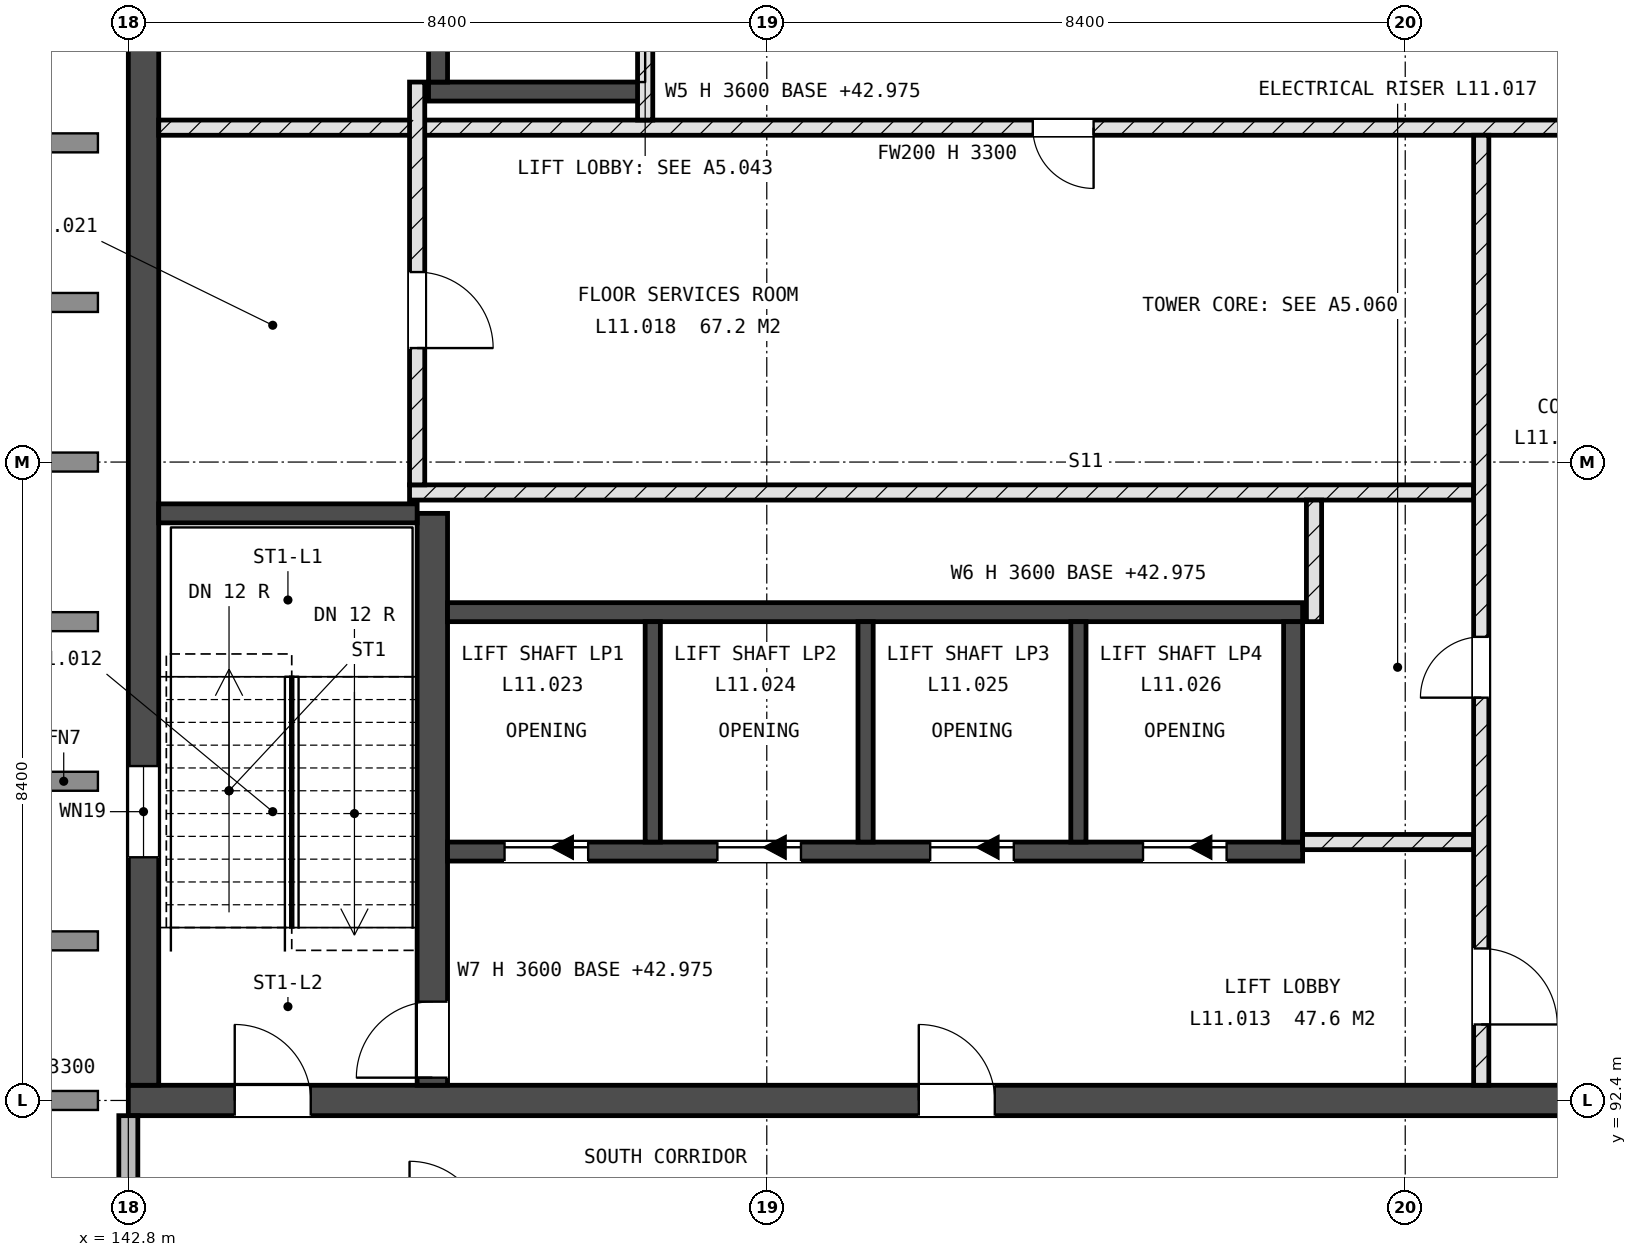
"""IFC4 building model, lengths in metres.
Left out: names, types, materials, properties, quantities, classifications, styles, units other than length and angle.
Written with IfcOpenShell. Run it as: python <this file> out.ifc"""

import sys

from ifc_helpers import new_model, si_unit, direction, frame, frame_2d, origin, place, context, subcontext, project, spatial, rectangle, extrude, element, fill, save


model = new_model("IFC4")
c1 = context("Model", 3, precision=1e-05, world=origin(), true_north=direction((0.0, 1.0)))
c2 = subcontext(c1, "Body", "Model", "MODEL_VIEW")
j1 = project(units=[si_unit("LENGTHUNIT", "METRE"), si_unit("PLANEANGLEUNIT", "RADIAN")], contexts=[c1])
p1 = place(None, origin())
s1 = spatial("IfcSite", under=j1, at=p1, CompositionType="ELEMENT")
p2 = place(p1, origin())
s2 = spatial("IfcBuilding", under=s1, at=p2, CompositionType="ELEMENT")
p3 = place(p2, frame((0.0, 0.0, 43.2)))
s3 = spatial("IfcBuildingStorey", under=s2, at=p3, CompositionType="ELEMENT", Elevation=43.2)
p4 = place(p3, frame((142.8, 92.4, -0.225), z_axis=(0.0, 0.0, 1.0), x_axis=(1.0, 0.0, 0.0)))
e1 = element("IfcWall", 1, at=p4, inside=s3, PredefinedType="SHEAR", context=c2, shape_type="SweptSolid", body=[
    extrude(rectangle(XDim=25.2, YDim=0.4, at=frame_2d((12.6, 0.0))), origin(), (0.0, 0.0, 1.0), 3.6),
])
p5 = place(p4, frame((1.4, 0.0, 0.225)))
e2 = element("IfcOpeningElement", 2, at=p5, cuts=e1, PredefinedType="OPENING", context=c2, shape_type="SweptSolid", body=[
    extrude(rectangle(XDim=1.0, YDim=2.1, at=frame_2d((0.5, 1.05))), frame((0.0, 0.21, 0.0), z_axis=(0.0, -1.0, 0.0), x_axis=(1.0, 0.0, 0.0)), (0.0, 0.0, 1.0), 0.42),
])
p6 = place(p4, frame((19.1, 0.0, 0.225)))
e3 = element("IfcOpeningElement", 3, at=p6, cuts=e1, PredefinedType="OPENING", context=c2, shape_type="SweptSolid", body=[
    extrude(rectangle(XDim=1.0, YDim=2.1, at=frame_2d((0.5, 1.05))), frame((0.0, 0.21, 0.0), z_axis=(0.0, -1.0, 0.0), x_axis=(1.0, 0.0, 0.0)), (0.0, 0.0, 1.0), 0.42),
])
p7 = place(p4, frame((10.4, 0.0, 0.225)))
e4 = element("IfcOpeningElement", 4, at=p7, cuts=e1, PredefinedType="OPENING", context=c2, shape_type="SweptSolid", body=[
    extrude(rectangle(XDim=1.0, YDim=2.1, at=frame_2d((0.5, 1.05))), frame((0.0, 0.21, 0.0), z_axis=(0.0, -1.0, 0.0), x_axis=(1.0, 0.0, 0.0)), (0.0, 0.0, 1.0), 0.42),
])
p8 = place(p3, frame((143.0, 92.6, -0.225), z_axis=(0.0, 0.0, 1.0), x_axis=(0.0, 1.0, 0.0)))
e5 = element("IfcWall", 5, at=p8, inside=s3, PredefinedType="SHEAR", context=c2, shape_type="SweptSolid", body=[
    extrude(rectangle(XDim=16.4, YDim=0.4, at=frame_2d((8.2, 0.0))), origin(), (0.0, 0.0, 1.0), 3.6),
])
p9 = place(p8, frame((3.0, 0.0, 1.825)))
e6 = element("IfcOpeningElement", 6, at=p9, cuts=e5, PredefinedType="OPENING", context=c2, shape_type="SweptSolid", body=[
    extrude(rectangle(XDim=1.2, YDim=0.9, at=frame_2d((0.6, 0.45))), frame((0.0, 0.21, 0.0), z_axis=(0.0, -1.0, 0.0), x_axis=(1.0, 0.0, 0.0)), (0.0, 0.0, 1.0), 0.42),
])
p10 = place(p3, frame((146.8, 92.6, -0.225), z_axis=(0.0, 0.0, 1.0), x_axis=(0.0, 1.0, 0.0)))
e7 = element("IfcWall", 7, at=p10, inside=s3, PredefinedType="SHEAR", context=c2, shape_type="SweptSolid", body=[
    extrude(rectangle(XDim=7.525, YDim=0.4, at=frame_2d((3.762, 0.0))), origin(), (0.0, 0.0, 1.0), 3.6),
])
p11 = place(p10, frame((0.1, 0.0, 0.225)))
e8 = element("IfcOpeningElement", 8, at=p11, cuts=e7, PredefinedType="OPENING", context=c2, shape_type="SweptSolid", body=[
    extrude(rectangle(XDim=1.0, YDim=2.1, at=frame_2d((0.5, 1.05))), frame((0.0, 0.21, 0.0), z_axis=(0.0, -1.0, 0.0), x_axis=(1.0, 0.0, 0.0)), (0.0, 0.0, 1.0), 0.42),
])
p12 = place(p3, frame((143.2, 100.125, -0.225), z_axis=(0.0, 0.0, 1.0), x_axis=(1.0, 0.0, 0.0)))
e9 = element("IfcWall", 9, at=p12, inside=s3, PredefinedType="SHEAR", context=c2, shape_type="SweptSolid", body=[
    extrude(rectangle(XDim=3.4, YDim=0.25, at=frame_2d((1.7, 0.0))), origin(), (0.0, 0.0, 1.0), 3.6),
])
p13 = place(p3, frame((147.0, 95.675, -0.225), z_axis=(0.0, 0.0, 1.0), x_axis=(1.0, 0.0, 0.0)))
e10 = element("IfcWall", 10, at=p13, inside=s3, PredefinedType="SHEAR", context=c2, shape_type="SweptSolid", body=[
    extrude(rectangle(XDim=11.25, YDim=0.25, at=frame_2d((5.625, 0.0))), origin(), (0.0, 0.0, 1.0), 3.6),
])
p14 = place(p13, frame((0.75, 0.0, 0.225)))
e11 = element("IfcOpeningElement", 11, at=p14, cuts=e10, PredefinedType="OPENING", context=c2, shape_type="SweptSolid", body=[
    extrude(rectangle(XDim=1.1, YDim=2.1, at=frame_2d((0.55, 1.05))), frame((0.0, 0.135, 0.0), z_axis=(0.0, -1.0, 0.0), x_axis=(1.0, 0.0, 0.0)), (0.0, 0.0, 1.0), 0.27),
])
p15 = place(p13, frame((3.55, 0.0, 0.225)))
e12 = element("IfcOpeningElement", 12, at=p15, cuts=e10, PredefinedType="OPENING", context=c2, shape_type="SweptSolid", body=[
    extrude(rectangle(XDim=1.1, YDim=2.1, at=frame_2d((0.55, 1.05))), frame((0.0, 0.135, 0.0), z_axis=(0.0, -1.0, 0.0), x_axis=(1.0, 0.0, 0.0)), (0.0, 0.0, 1.0), 0.27),
])
p16 = place(p13, frame((6.35, 0.0, 0.225)))
e13 = element("IfcOpeningElement", 13, at=p16, cuts=e10, PredefinedType="OPENING", context=c2, shape_type="SweptSolid", body=[
    extrude(rectangle(XDim=1.1, YDim=2.1, at=frame_2d((0.55, 1.05))), frame((0.0, 0.135, 0.0), z_axis=(0.0, -1.0, 0.0), x_axis=(1.0, 0.0, 0.0)), (0.0, 0.0, 1.0), 0.27),
])
p17 = place(p13, frame((9.15, 0.0, 0.225)))
e14 = element("IfcOpeningElement", 14, at=p17, cuts=e10, PredefinedType="OPENING", context=c2, shape_type="SweptSolid", body=[
    extrude(rectangle(XDim=1.1, YDim=2.1, at=frame_2d((0.55, 1.05))), frame((0.0, 0.135, 0.0), z_axis=(0.0, -1.0, 0.0), x_axis=(1.0, 0.0, 0.0)), (0.0, 0.0, 1.0), 0.27),
])
p18 = place(p3, frame((147.0, 98.825, -0.225), z_axis=(0.0, 0.0, 1.0), x_axis=(1.0, 0.0, 0.0)))
e15 = element("IfcWall", 15, at=p18, inside=s3, PredefinedType="SHEAR", context=c2, shape_type="SweptSolid", body=[
    extrude(rectangle(XDim=11.25, YDim=0.25, at=frame_2d((5.625, 0.0))), origin(), (0.0, 0.0, 1.0), 3.6),
])
p19 = place(p3, frame((158.125, 95.8, -0.225), z_axis=(0.0, 0.0, 1.0), x_axis=(0.0, 1.0, 0.0)))
e16 = element("IfcWall", 16, at=p19, inside=s3, PredefinedType="SHEAR", context=c2, shape_type="SweptSolid", body=[
    extrude(rectangle(XDim=2.9, YDim=0.25, at=frame_2d((1.45, 0.0))), origin(), (0.0, 0.0, 1.0), 3.6),
])
for number, where, z_axis, x_axis in (
    (17, (149.7, 95.8, -0.225), (0.0, 0.0, 1.0), (0.0, 1.0, 0.0)),
    (18, (152.5, 95.8, -0.225), (0.0, 0.0, 1.0), (0.0, 1.0, 0.0)),
    (19, (155.3, 95.8, -0.225), (0.0, 0.0, 1.0), (0.0, 1.0, 0.0)),
):
    element("IfcWall", number, at=place(p3, frame(where, z_axis=z_axis, x_axis=x_axis)), inside=s3, PredefinedType="SHEAR", context=c2, shape_type="SweptSolid", body=[
        extrude(rectangle(XDim=2.9, YDim=0.2, at=frame_2d((1.45, 0.0))), origin(), (0.0, 0.0, 1.0), 3.6),
    ])
p20 = place(p3, frame((146.75, 105.675, -0.225), z_axis=(0.0, 0.0, 1.0), x_axis=(1.0, 0.0, 0.0)))
e20 = element("IfcWall", 20, at=p20, inside=s3, PredefinedType="SHEAR", context=c2, shape_type="SweptSolid", body=[
    extrude(rectangle(XDim=2.85, YDim=0.25, at=frame_2d((1.425, 0.0))), origin(), (0.0, 0.0, 1.0), 3.6),
])
p21 = place(p3, frame((146.875, 105.8, -0.225), z_axis=(0.0, 0.0, 1.0), x_axis=(0.0, 1.0, 0.0)))
e21 = element("IfcWall", 21, at=p21, inside=s3, PredefinedType="SHEAR", context=c2, shape_type="SweptSolid", body=[
    extrude(rectangle(XDim=2.9, YDim=0.25, at=frame_2d((1.45, 0.0))), origin(), (0.0, 0.0, 1.0), 3.6),
])
p22 = place(p3, frame((142.8, 84.4, 0.0), z_axis=(0.0, 0.0, 1.0), x_axis=(0.0, 1.0, 0.0)))
e22 = element("IfcWall", 22, at=p22, inside=s3, PredefinedType="STANDARD", context=c2, shape_type="SweptSolid", body=[
    extrude(rectangle(XDim=7.8, YDim=0.25, at=frame_2d((3.9, 0.0))), origin(), (0.0, 0.0, 1.0), 3.3),
])
p23 = place(p22, frame((2.3, 0.0, 2.1)))
e23 = element("IfcOpeningElement", 23, at=p23, cuts=e22, PredefinedType="OPENING", context=c2, shape_type="SweptSolid", body=[
    extrude(rectangle(XDim=0.9, YDim=0.6, at=frame_2d((0.45, 0.3))), frame((0.0, 0.135, 0.0), z_axis=(0.0, -1.0, 0.0), x_axis=(1.0, 0.0, 0.0)), (0.0, 0.0, 1.0), 0.27),
])
p24 = place(p3, frame((158.25, 95.8, 0.0), z_axis=(0.0, 0.0, 1.0), x_axis=(1.0, 0.0, 0.0)))
e24 = element("IfcWall", 24, at=p24, inside=s3, PredefinedType="SOLIDWALL", context=c2, shape_type="SweptSolid", body=[
    extrude(rectangle(XDim=2.25, YDim=0.2, at=frame_2d((1.125, 0.0))), origin(), (0.0, 0.0, 1.0), 3.3),
])
p25 = place(p3, frame((146.5, 100.4, 0.0), z_axis=(0.0, 0.0, 1.0), x_axis=(1.0, 0.0, 0.0)))
e25 = element("IfcWall", 25, at=p25, inside=s3, PredefinedType="SOLIDWALL", context=c2, shape_type="SweptSolid", body=[
    extrude(rectangle(XDim=14.0, YDim=0.2, at=frame_2d((7.0, 0.0))), origin(), (0.0, 0.0, 1.0), 3.3),
])
p26 = place(p3, frame((143.2, 105.2, 0.0), z_axis=(0.0, 0.0, 1.0), x_axis=(1.0, 0.0, 0.0)))
e26 = element("IfcWall", 26, at=p26, inside=s3, PredefinedType="SOLIDWALL", context=c2, shape_type="SweptSolid", body=[
    extrude(rectangle(XDim=20.75, YDim=0.2, at=frame_2d((10.375, 0.0))), origin(), (0.0, 0.0, 1.0), 3.3),
])
p27 = place(p26, frame((11.5, 0.0, 0.0)))
e27 = element("IfcOpeningElement", 27, at=p27, cuts=e26, PredefinedType="OPENING", context=c2, shape_type="SweptSolid", body=[
    extrude(rectangle(XDim=0.8, YDim=2.1, at=frame_2d((0.4, 1.05))), frame((0.0, 0.11, 0.0), z_axis=(0.0, -1.0, 0.0), x_axis=(1.0, 0.0, 0.0)), (0.0, 0.0, 1.0), 0.22),
])
p28 = place(p26, frame((18.8, 0.0, 0.0)))
e28 = element("IfcOpeningElement", 28, at=p28, cuts=e26, PredefinedType="OPENING", context=c2, shape_type="SweptSolid", body=[
    extrude(rectangle(XDim=1.0, YDim=2.1, at=frame_2d((0.5, 1.05))), frame((0.0, 0.11, 0.0), z_axis=(0.0, -1.0, 0.0), x_axis=(1.0, 0.0, 0.0)), (0.0, 0.0, 1.0), 0.22),
])
p29 = place(p3, frame((146.6, 100.5, 0.0), z_axis=(0.0, 0.0, 1.0), x_axis=(0.0, 1.0, 0.0)))
e29 = element("IfcWall", 29, at=p29, inside=s3, PredefinedType="SOLIDWALL", context=c2, shape_type="SweptSolid", body=[
    extrude(rectangle(XDim=5.3, YDim=0.2, at=frame_2d((2.65, 0.0))), origin(), (0.0, 0.0, 1.0), 3.3),
])
p30 = place(p29, frame((1.8, 0.0, 0.0)))
e30 = element("IfcOpeningElement", 30, at=p30, cuts=e29, PredefinedType="OPENING", context=c2, shape_type="SweptSolid", body=[
    extrude(rectangle(XDim=1.0, YDim=2.1, at=frame_2d((0.5, 1.05))), frame((0.0, 0.11, 0.0), z_axis=(0.0, -1.0, 0.0), x_axis=(1.0, 0.0, 0.0)), (0.0, 0.0, 1.0), 0.22),
])
p31 = place(p3, frame((149.6, 105.3, 0.0), z_axis=(0.0, 0.0, 1.0), x_axis=(0.0, 1.0, 0.0)))
e31 = element("IfcWall", 31, at=p31, inside=s3, PredefinedType="SOLIDWALL", context=c2, shape_type="SweptSolid", body=[
    extrude(rectangle(XDim=3.7, YDim=0.2, at=frame_2d((1.85, 0.0))), origin(), (0.0, 0.0, 1.0), 3.3),
])
p32 = place(p31, frame((1.4, 0.0, 0.0)))
e32 = element("IfcOpeningElement", 32, at=p32, cuts=e31, PredefinedType="OPENING", context=c2, shape_type="SweptSolid", body=[
    extrude(rectangle(XDim=1.1, YDim=2.1, at=frame_2d((0.55, 1.05))), frame((0.0, 0.11, 0.0), z_axis=(0.0, -1.0, 0.0), x_axis=(1.0, 0.0, 0.0)), (0.0, 0.0, 1.0), 0.22),
])
p33 = place(p3, frame((158.4, 98.7, 0.0), z_axis=(0.0, 0.0, 1.0), x_axis=(0.0, 1.0, 0.0)))
e33 = element("IfcWall", 33, at=p33, inside=s3, PredefinedType="SOLIDWALL", context=c2, shape_type="SweptSolid", body=[
    extrude(rectangle(XDim=1.6, YDim=0.2, at=frame_2d((0.8, 0.0))), origin(), (0.0, 0.0, 1.0), 3.3),
])
p34 = place(p3, frame((160.6, 92.6, 0.0), z_axis=(0.0, 0.0, 1.0), x_axis=(0.0, 1.0, 0.0)))
e34 = element("IfcWall", 34, at=p34, inside=s3, PredefinedType="SOLIDWALL", context=c2, shape_type="SweptSolid", body=[
    extrude(rectangle(XDim=12.5, YDim=0.2, at=frame_2d((6.25, 0.0))), origin(), (0.0, 0.0, 1.0), 3.3),
])
p35 = place(p34, frame((5.1, 0.0, 0.0)))
e35 = element("IfcOpeningElement", 35, at=p35, cuts=e34, PredefinedType="OPENING", context=c2, shape_type="SweptSolid", body=[
    extrude(rectangle(XDim=0.8, YDim=2.1, at=frame_2d((0.4, 1.05))), frame((0.0, 0.11, 0.0), z_axis=(0.0, -1.0, 0.0), x_axis=(1.0, 0.0, 0.0)), (0.0, 0.0, 1.0), 0.22),
])
p36 = place(p34, frame((0.8, 0.0, 0.0)))
e36 = element("IfcOpeningElement", 36, at=p36, cuts=e34, PredefinedType="OPENING", context=c2, shape_type="SweptSolid", body=[
    extrude(rectangle(XDim=1.0, YDim=2.1, at=frame_2d((0.5, 1.05))), frame((0.0, 0.11, 0.0), z_axis=(0.0, -1.0, 0.0), x_axis=(1.0, 0.0, 0.0)), (0.0, 0.0, 1.0), 0.22),
])
p37 = place(p9, origin())
e37 = element("IfcWindow", 37, at=p37, inside=s3, PartitioningType="SINGLE_PANEL", PredefinedType="WINDOW", context=c2, shape_type="SweptSolid", body=[
    extrude(rectangle(XDim=1.2, YDim=0.9, at=frame_2d((0.6, 0.45))), frame((0.0, 0.03, 0.0), z_axis=(0.0, -1.0, 0.0), x_axis=(1.0, 0.0, 0.0)), (0.0, 0.0, 1.0), 0.06),
])
fill(e6, e37)
p38 = place(p14, origin())
e38 = element("IfcDoor", 38, at=p38, inside=s3, OperationType="SLIDING_TO_LEFT", PredefinedType="DOOR", context=c2, shape_type="SweptSolid", body=[
    extrude(rectangle(XDim=1.1, YDim=2.1, at=frame_2d((0.55, 1.05))), frame((0.0, 0.025, 0.0), z_axis=(0.0, -1.0, 0.0), x_axis=(1.0, 0.0, 0.0)), (0.0, 0.0, 1.0), 0.05),
])
fill(e11, e38)
p39 = place(p15, origin())
e39 = element("IfcDoor", 39, at=p39, inside=s3, OperationType="SLIDING_TO_LEFT", PredefinedType="DOOR", context=c2, shape_type="SweptSolid", body=[
    extrude(rectangle(XDim=1.1, YDim=2.1, at=frame_2d((0.55, 1.05))), frame((0.0, 0.025, 0.0), z_axis=(0.0, -1.0, 0.0), x_axis=(1.0, 0.0, 0.0)), (0.0, 0.0, 1.0), 0.05),
])
fill(e12, e39)
p40 = place(p16, origin())
e40 = element("IfcDoor", 40, at=p40, inside=s3, OperationType="SLIDING_TO_LEFT", PredefinedType="DOOR", context=c2, shape_type="SweptSolid", body=[
    extrude(rectangle(XDim=1.1, YDim=2.1, at=frame_2d((0.55, 1.05))), frame((0.0, 0.025, 0.0), z_axis=(0.0, -1.0, 0.0), x_axis=(1.0, 0.0, 0.0)), (0.0, 0.0, 1.0), 0.05),
])
fill(e13, e40)
p41 = place(p17, origin())
e41 = element("IfcDoor", 41, at=p41, inside=s3, OperationType="SLIDING_TO_LEFT", PredefinedType="DOOR", context=c2, shape_type="SweptSolid", body=[
    extrude(rectangle(XDim=1.1, YDim=2.1, at=frame_2d((0.55, 1.05))), frame((0.0, 0.025, 0.0), z_axis=(0.0, -1.0, 0.0), x_axis=(1.0, 0.0, 0.0)), (0.0, 0.0, 1.0), 0.05),
])
fill(e14, e41)
p42 = place(p5, origin())
e42 = element("IfcDoor", 42, at=p42, inside=s3, OperationType="SINGLE_SWING_RIGHT", PredefinedType="DOOR", context=c2, shape_type="SweptSolid", body=[
    extrude(rectangle(XDim=1.0, YDim=2.1, at=frame_2d((0.5, 1.05))), frame((0.0, 0.025, 0.0), z_axis=(0.0, -1.0, 0.0), x_axis=(1.0, 0.0, 0.0)), (0.0, 0.0, 1.0), 0.05),
])
fill(e2, e42)
p43 = place(p11, origin())
e43 = element("IfcDoor", 43, at=p43, inside=s3, OperationType="SINGLE_SWING_RIGHT", PredefinedType="DOOR", context=c2, shape_type="SweptSolid", body=[
    extrude(rectangle(XDim=1.0, YDim=2.1, at=frame_2d((0.5, 1.05))), frame((0.0, 0.025, 0.0), z_axis=(0.0, -1.0, 0.0), x_axis=(1.0, 0.0, 0.0)), (0.0, 0.0, 1.0), 0.05),
])
fill(e8, e43)
p44 = place(p35, origin())
e44 = element("IfcDoor", 44, at=p44, inside=s3, OperationType="SINGLE_SWING_RIGHT", PredefinedType="DOOR", context=c2, shape_type="SweptSolid", body=[
    extrude(rectangle(XDim=0.8, YDim=2.1, at=frame_2d((0.4, 1.05))), frame((0.0, 0.025, 0.0), z_axis=(0.0, -1.0, 0.0), x_axis=(1.0, 0.0, 0.0)), (0.0, 0.0, 1.0), 0.05),
])
fill(e35, e44)
p45 = place(p27, origin())
e45 = element("IfcDoor", 45, at=p45, inside=s3, OperationType="SINGLE_SWING_RIGHT", PredefinedType="DOOR", context=c2, shape_type="SweptSolid", body=[
    extrude(rectangle(XDim=0.8, YDim=2.1, at=frame_2d((0.4, 1.05))), frame((0.0, 0.025, 0.0), z_axis=(0.0, -1.0, 0.0), x_axis=(1.0, 0.0, 0.0)), (0.0, 0.0, 1.0), 0.05),
])
fill(e27, e45)
p46 = place(p30, origin())
e46 = element("IfcDoor", 46, at=p46, inside=s3, OperationType="SINGLE_SWING_LEFT", PredefinedType="DOOR", context=c2, shape_type="SweptSolid", body=[
    extrude(rectangle(XDim=1.0, YDim=2.1, at=frame_2d((0.5, 1.05))), frame((0.0, 0.025, 0.0), z_axis=(0.0, -1.0, 0.0), x_axis=(1.0, 0.0, 0.0)), (0.0, 0.0, 1.0), 0.05),
])
fill(e30, e46)
p47 = place(p7, origin())
e47 = element("IfcDoor", 47, at=p47, inside=s3, OperationType="SINGLE_SWING_RIGHT", PredefinedType="DOOR", context=c2, shape_type="SweptSolid", body=[
    extrude(rectangle(XDim=1.0, YDim=2.1, at=frame_2d((0.5, 1.05))), frame((0.0, 0.025, 0.0), z_axis=(0.0, -1.0, 0.0), x_axis=(1.0, 0.0, 0.0)), (0.0, 0.0, 1.0), 0.05),
])
fill(e4, e47)
p48 = place(p36, origin())
e48 = element("IfcDoor", 48, at=p48, inside=s3, OperationType="SINGLE_SWING_LEFT", PredefinedType="DOOR", context=c2, shape_type="SweptSolid", body=[
    extrude(rectangle(XDim=1.0, YDim=2.1, at=frame_2d((0.5, 1.05))), frame((0.0, 0.025, 0.0), z_axis=(0.0, -1.0, 0.0), x_axis=(1.0, 0.0, 0.0)), (0.0, 0.0, 1.0), 0.05),
])
fill(e36, e48)
save(model, sys.argv[1])
